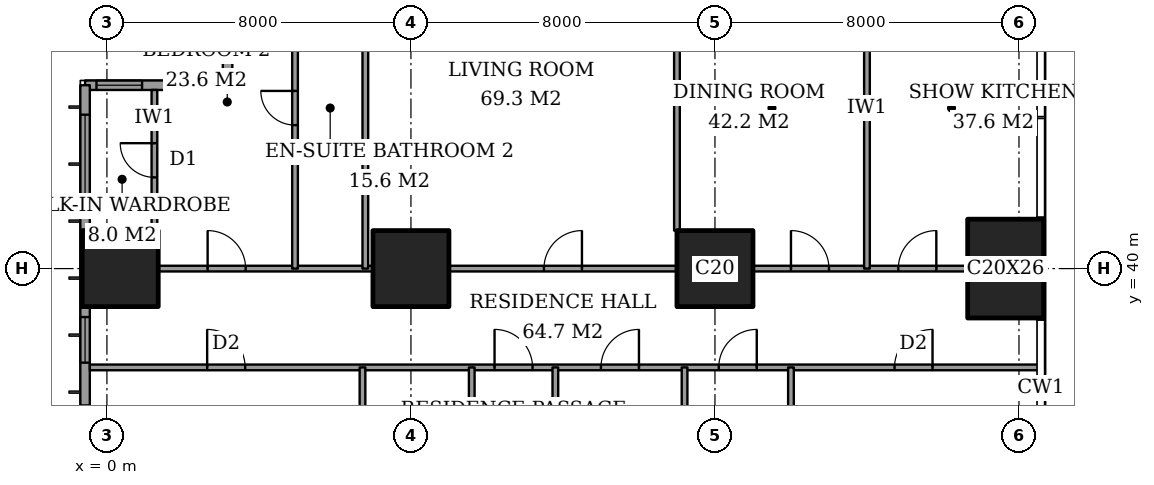
"""IFC4 building model, lengths in metres.
Left out: names, types, materials, properties, quantities, classifications, styles, units other than length and angle.
Written with IfcOpenShell. Run it as: python <this file> out.ifc"""

import sys

from ifc_helpers import new_model, si_unit, direction, frame, frame_2d, origin, origin_2d, place, context, subcontext, project, spatial, rectangle, extrude, element, fill, save


model = new_model("IFC4")
c1 = context("Model", 3, precision=1e-05, world=origin(), true_north=direction((0.0, 1.0)))
c2 = subcontext(c1, "Body", "Model", "MODEL_VIEW")
j1 = project(units=[si_unit("LENGTHUNIT", "METRE"), si_unit("PLANEANGLEUNIT", "RADIAN")], contexts=[c1])
p1 = place(None, origin())
s1 = spatial("IfcSite", under=j1, at=p1, CompositionType="ELEMENT")
p2 = place(p1, origin())
s2 = spatial("IfcBuilding", under=s1, at=p2, CompositionType="ELEMENT")
p3 = place(p2, frame((0.0, 0.0, 76.4)))
s3 = spatial("IfcBuildingStorey", under=s2, at=p3, CompositionType="ELEMENT", Elevation=76.4)
for number, where, z_axis, x_axis in (
    (1, (0.35, 40.0, 0.0), (0.0, 0.0, 1.0), (1.0, 0.0, 0.0)),
    (2, (8.0, 40.0, 0.0), (0.0, 0.0, 1.0), (1.0, 0.0, 0.0)),
    (3, (16.0, 40.0, 0.0), (0.0, 0.0, 1.0), (1.0, 0.0, 0.0)),
):
    element("IfcColumn", number, at=place(p3, frame(where, z_axis=z_axis, x_axis=x_axis)), inside=s3, PredefinedType="COLUMN", context=c2, shape_type="SweptSolid", body=[
        extrude(rectangle(XDim=2.0, YDim=2.0, at=origin_2d()), origin(), (0.0, 0.0, 1.0), 3.6),
    ])
p4 = place(p3, frame((23.65, 40.0, 0.0), z_axis=(0.0, 0.0, 1.0), x_axis=(1.0, 0.0, 0.0)))
e4 = element("IfcColumn", 4, at=p4, inside=s3, PredefinedType="COLUMN", context=c2, shape_type="SweptSolid", body=[
    extrude(rectangle(XDim=2.0, YDim=2.6, at=origin_2d()), origin(), (0.0, 0.0, 1.0), 3.6),
])
p5 = place(p3, frame((3.175, 48.575, 0.0), z_axis=(0.0, 0.0, 1.0), x_axis=(0.0, -1.0, 0.0)))
e5 = element("IfcWall", 5, at=p5, inside=s3, PredefinedType="SOLIDWALL", context=c2, shape_type="SweptSolid", body=[
    extrude(rectangle(XDim=3.75, YDim=0.25, at=frame_2d((1.875, 0.0))), origin(), (0.0, 0.0, 1.0), 3.6),
])
p6 = place(p5, frame((0.738, 0.0, 0.6)))
e6 = element("IfcOpeningElement", 6, at=p6, cuts=e5, PredefinedType="OPENING", context=c2, shape_type="SweptSolid", body=[
    extrude(rectangle(XDim=2.4, YDim=2.0, at=frame_2d((1.2, 1.0))), frame((0.0, 0.135, 0.0), z_axis=(0.0, -1.0, 0.0), x_axis=(1.0, 0.0, 0.0)), (0.0, 0.0, 1.0), 0.27),
])
p7 = place(p3, frame((3.175, 44.825, 0.0), z_axis=(0.0, 0.0, 1.0), x_axis=(-1.0, 0.0, 0.0)))
e7 = element("IfcWall", 7, at=p7, inside=s3, PredefinedType="SOLIDWALL", context=c2, shape_type="SweptSolid", body=[
    extrude(rectangle(XDim=3.75, YDim=0.25, at=frame_2d((1.875, 0.0))), origin(), (0.0, 0.0, 1.0), 3.6),
])
p8 = place(p7, frame((0.363, 0.0, 0.6)))
e8 = element("IfcOpeningElement", 8, at=p8, cuts=e7, PredefinedType="OPENING", context=c2, shape_type="SweptSolid", body=[
    extrude(rectangle(XDim=1.2, YDim=2.0, at=frame_2d((0.6, 1.0))), frame((0.0, 0.135, 0.0), z_axis=(0.0, -1.0, 0.0), x_axis=(1.0, 0.0, 0.0)), (0.0, 0.0, 1.0), 0.27),
])
p9 = place(p7, frame((2.25, 0.0, 0.6)))
e9 = element("IfcOpeningElement", 9, at=p9, cuts=e7, PredefinedType="OPENING", context=c2, shape_type="SweptSolid", body=[
    extrude(rectangle(XDim=1.2, YDim=2.0, at=frame_2d((0.6, 1.0))), frame((0.0, 0.135, 0.0), z_axis=(0.0, -1.0, 0.0), x_axis=(1.0, 0.0, 0.0)), (0.0, 0.0, 1.0), 0.27),
])
p10 = place(p3, frame((-0.575, 44.825, 0.0), z_axis=(0.0, 0.0, 1.0), x_axis=(0.0, -1.0, 0.0)))
e10 = element("IfcWall", 10, at=p10, inside=s3, PredefinedType="SOLIDWALL", context=c2, shape_type="SweptSolid", body=[
    extrude(rectangle(XDim=41.65, YDim=0.25, at=frame_2d((20.825, 0.0))), origin(), (0.0, 0.0, 1.0), 3.6),
])
p11 = place(p10, frame((0.775, 0.0, 0.6)))
e11 = element("IfcOpeningElement", 11, at=p11, cuts=e10, PredefinedType="OPENING", context=c2, shape_type="SweptSolid", body=[
    extrude(rectangle(XDim=2.4, YDim=2.0, at=frame_2d((1.2, 1.0))), frame((0.0, 0.135, 0.0), z_axis=(0.0, -1.0, 0.0), x_axis=(1.0, 0.0, 0.0)), (0.0, 0.0, 1.0), 0.27),
])
p12 = place(p10, frame((6.1, 0.0, 0.6)))
e12 = element("IfcOpeningElement", 12, at=p12, cuts=e10, PredefinedType="OPENING", context=c2, shape_type="SweptSolid", body=[
    extrude(rectangle(XDim=1.2, YDim=2.0, at=frame_2d((0.6, 1.0))), frame((0.0, 0.135, 0.0), z_axis=(0.0, -1.0, 0.0), x_axis=(1.0, 0.0, 0.0)), (0.0, 0.0, 1.0), 0.27),
])
p13 = place(p10, frame((8.425, 0.0, 0.6)))
e13 = element("IfcOpeningElement", 13, at=p13, cuts=e10, PredefinedType="OPENING", context=c2, shape_type="SweptSolid", body=[
    extrude(rectangle(XDim=2.4, YDim=2.0, at=frame_2d((1.2, 1.0))), frame((0.0, 0.135, 0.0), z_axis=(0.0, -1.0, 0.0), x_axis=(1.0, 0.0, 0.0)), (0.0, 0.0, 1.0), 0.27),
])
p14 = place(p10, frame((15.625, 0.0, 0.6)))
e14 = element("IfcOpeningElement", 14, at=p14, cuts=e10, PredefinedType="OPENING", context=c2, shape_type="SweptSolid", body=[
    extrude(rectangle(XDim=2.4, YDim=2.0, at=frame_2d((1.2, 1.0))), frame((0.0, 0.135, 0.0), z_axis=(0.0, -1.0, 0.0), x_axis=(1.0, 0.0, 0.0)), (0.0, 0.0, 1.0), 0.27),
])
p15 = place(p10, frame((23.625, 0.0, 0.6)))
e15 = element("IfcOpeningElement", 15, at=p15, cuts=e10, PredefinedType="OPENING", context=c2, shape_type="SweptSolid", body=[
    extrude(rectangle(XDim=2.4, YDim=2.0, at=frame_2d((1.2, 1.0))), frame((0.0, 0.135, 0.0), z_axis=(0.0, -1.0, 0.0), x_axis=(1.0, 0.0, 0.0)), (0.0, 0.0, 1.0), 0.27),
])
p16 = place(p10, frame((30.625, 0.0, 0.6)))
e16 = element("IfcOpeningElement", 16, at=p16, cuts=e10, PredefinedType="OPENING", context=c2, shape_type="SweptSolid", body=[
    extrude(rectangle(XDim=2.4, YDim=2.0, at=frame_2d((1.2, 1.0))), frame((0.0, 0.135, 0.0), z_axis=(0.0, -1.0, 0.0), x_axis=(1.0, 0.0, 0.0)), (0.0, 0.0, 1.0), 0.27),
])
p17 = place(p10, frame((34.225, 0.0, 0.6)))
e17 = element("IfcOpeningElement", 17, at=p17, cuts=e10, PredefinedType="OPENING", context=c2, shape_type="SweptSolid", body=[
    extrude(rectangle(XDim=1.2, YDim=2.0, at=frame_2d((0.6, 1.0))), frame((0.0, 0.135, 0.0), z_axis=(0.0, -1.0, 0.0), x_axis=(1.0, 0.0, 0.0)), (0.0, 0.0, 1.0), 0.27),
])
p18 = place(p10, frame((38.475, 0.0, 0.6)))
e18 = element("IfcOpeningElement", 18, at=p18, cuts=e10, PredefinedType="OPENING", context=c2, shape_type="SweptSolid", body=[
    extrude(rectangle(XDim=2.4, YDim=2.0, at=frame_2d((1.2, 1.0))), frame((0.0, 0.135, 0.0), z_axis=(0.0, -1.0, 0.0), x_axis=(1.0, 0.0, 0.0)), (0.0, 0.0, 1.0), 0.27),
])
p19 = place(p3, frame((-0.45, 37.4, 0.0), z_axis=(0.0, 0.0, 1.0), x_axis=(1.0, 0.0, 0.0)))
e19 = element("IfcWall", 19, at=p19, inside=s3, PredefinedType="PARTITIONING", context=c2, shape_type="SweptSolid", body=[
    extrude(rectangle(XDim=25.011, YDim=0.15, at=frame_2d((12.505, 0.0))), origin(), (0.0, 0.0, 1.0), 3.35),
])
p20 = place(p19, frame((10.65, 0.0, 0.0)))
e20 = element("IfcOpeningElement", 20, at=p20, cuts=e19, PredefinedType="OPENING", context=c2, shape_type="SweptSolid", body=[
    extrude(rectangle(XDim=1.0, YDim=2.1, at=frame_2d((0.5, 1.05))), frame((0.0, 0.085, 0.0), z_axis=(0.0, -1.0, 0.0), x_axis=(1.0, 0.0, 0.0)), (0.0, 0.0, 1.0), 0.17),
])
p21 = place(p19, frame((3.087, 0.0, 0.0)))
e21 = element("IfcOpeningElement", 21, at=p21, cuts=e19, PredefinedType="OPENING", context=c2, shape_type="SweptSolid", body=[
    extrude(rectangle(XDim=1.0, YDim=2.1, at=frame_2d((0.5, 1.05))), frame((0.0, 0.085, 0.0), z_axis=(0.0, -1.0, 0.0), x_axis=(1.0, 0.0, 0.0)), (0.0, 0.0, 1.0), 0.17),
])
p22 = place(p19, frame((13.45, 0.0, 0.0)))
e22 = element("IfcOpeningElement", 22, at=p22, cuts=e19, PredefinedType="OPENING", context=c2, shape_type="SweptSolid", body=[
    extrude(rectangle(XDim=1.0, YDim=2.1, at=frame_2d((0.5, 1.05))), frame((0.0, 0.085, 0.0), z_axis=(0.0, -1.0, 0.0), x_axis=(1.0, 0.0, 0.0)), (0.0, 0.0, 1.0), 0.17),
])
p23 = place(p19, frame((16.55, 0.0, 0.0)))
e23 = element("IfcOpeningElement", 23, at=p23, cuts=e19, PredefinedType="OPENING", context=c2, shape_type="SweptSolid", body=[
    extrude(rectangle(XDim=1.0, YDim=2.1, at=frame_2d((0.5, 1.05))), frame((0.0, 0.085, 0.0), z_axis=(0.0, -1.0, 0.0), x_axis=(1.0, 0.0, 0.0)), (0.0, 0.0, 1.0), 0.17),
])
p24 = place(p19, frame((21.175, 0.0, 0.0)))
e24 = element("IfcOpeningElement", 24, at=p24, cuts=e19, PredefinedType="OPENING", context=c2, shape_type="SweptSolid", body=[
    extrude(rectangle(XDim=1.0, YDim=2.1, at=frame_2d((0.5, 1.05))), frame((0.0, 0.085, 0.0), z_axis=(0.0, -1.0, 0.0), x_axis=(1.0, 0.0, 0.0)), (0.0, 0.0, 1.0), 0.17),
])
p25 = place(p3, frame((1.35, 40.0, 0.0), z_axis=(0.0, 0.0, 1.0), x_axis=(1.0, 0.0, 0.0)))
e25 = element("IfcWall", 25, at=p25, inside=s3, PredefinedType="PARTITIONING", context=c2, shape_type="SweptSolid", body=[
    extrude(rectangle(XDim=5.65, YDim=0.15, at=frame_2d((2.825, 0.0))), origin(), (0.0, 0.0, 1.0), 3.35),
])
p26 = place(p25, frame((1.3, 0.0, 0.0)))
e26 = element("IfcOpeningElement", 26, at=p26, cuts=e25, PredefinedType="OPENING", context=c2, shape_type="SweptSolid", body=[
    extrude(rectangle(XDim=1.0, YDim=2.1, at=frame_2d((0.5, 1.05))), frame((0.0, 0.085, 0.0), z_axis=(0.0, -1.0, 0.0), x_axis=(1.0, 0.0, 0.0)), (0.0, 0.0, 1.0), 0.17),
])
p27 = place(p3, frame((9.0, 40.0, 0.0), z_axis=(0.0, 0.0, 1.0), x_axis=(1.0, 0.0, 0.0)))
e27 = element("IfcWall", 27, at=p27, inside=s3, PredefinedType="PARTITIONING", context=c2, shape_type="SweptSolid", body=[
    extrude(rectangle(XDim=6.0, YDim=0.15, at=frame_2d((3.0, 0.0))), origin(), (0.0, 0.0, 1.0), 3.35),
])
p28 = place(p27, frame((2.5, 0.0, 0.0)))
e28 = element("IfcOpeningElement", 28, at=p28, cuts=e27, PredefinedType="OPENING", context=c2, shape_type="SweptSolid", body=[
    extrude(rectangle(XDim=1.0, YDim=2.1, at=frame_2d((0.5, 1.05))), frame((0.0, 0.085, 0.0), z_axis=(0.0, -1.0, 0.0), x_axis=(1.0, 0.0, 0.0)), (0.0, 0.0, 1.0), 0.17),
])
p29 = place(p3, frame((17.0, 40.0, 0.0), z_axis=(0.0, 0.0, 1.0), x_axis=(1.0, 0.0, 0.0)))
e29 = element("IfcWall", 29, at=p29, inside=s3, PredefinedType="PARTITIONING", context=c2, shape_type="SweptSolid", body=[
    extrude(rectangle(XDim=5.65, YDim=0.15, at=frame_2d((2.825, 0.0))), origin(), (0.0, 0.0, 1.0), 3.35),
])
p30 = place(p29, frame((1.0, 0.0, 0.0)))
e30 = element("IfcOpeningElement", 30, at=p30, cuts=e29, PredefinedType="OPENING", context=c2, shape_type="SweptSolid", body=[
    extrude(rectangle(XDim=1.0, YDim=2.1, at=frame_2d((0.5, 1.05))), frame((0.0, 0.085, 0.0), z_axis=(0.0, -1.0, 0.0), x_axis=(1.0, 0.0, 0.0)), (0.0, 0.0, 1.0), 0.17),
])
p31 = place(p29, frame((3.825, 0.0, 0.0)))
e31 = element("IfcOpeningElement", 31, at=p31, cuts=e29, PredefinedType="OPENING", context=c2, shape_type="SweptSolid", body=[
    extrude(rectangle(XDim=1.0, YDim=2.1, at=frame_2d((0.5, 1.05))), frame((0.0, 0.085, 0.0), z_axis=(0.0, -1.0, 0.0), x_axis=(1.0, 0.0, 0.0)), (0.0, 0.0, 1.0), 0.17),
])
p32 = place(p3, frame((1.25, 41.0, 0.0), z_axis=(0.0, 0.0, 1.0), x_axis=(0.0, 1.0, 0.0)))
e32 = element("IfcWall", 32, at=p32, inside=s3, PredefinedType="PARTITIONING", context=c2, shape_type="SweptSolid", body=[
    extrude(rectangle(XDim=3.7, YDim=0.15, at=frame_2d((1.85, 0.0))), origin(), (0.0, 0.0, 1.0), 3.35),
])
p33 = place(p32, frame((1.4, 0.0, 0.0)))
e33 = element("IfcOpeningElement", 33, at=p33, cuts=e32, PredefinedType="OPENING", context=c2, shape_type="SweptSolid", body=[
    extrude(rectangle(XDim=0.9, YDim=2.1, at=frame_2d((0.45, 1.05))), frame((0.0, 0.085, 0.0), z_axis=(0.0, -1.0, 0.0), x_axis=(1.0, 0.0, 0.0)), (0.0, 0.0, 1.0), 0.17),
])
p34 = place(p3, frame((4.95, 40.0, 0.0), z_axis=(0.0, 0.0, 1.0), x_axis=(0.0, 1.0, 0.0)))
e34 = element("IfcWall", 34, at=p34, inside=s3, PredefinedType="PARTITIONING", context=c2, shape_type="SweptSolid", body=[
    extrude(rectangle(XDim=8.45, YDim=0.15, at=frame_2d((4.225, 0.0))), origin(), (0.0, 0.0, 1.0), 3.35),
])
p35 = place(p34, frame((3.775, 0.0, 0.0)))
e35 = element("IfcOpeningElement", 35, at=p35, cuts=e34, PredefinedType="OPENING", context=c2, shape_type="SweptSolid", body=[
    extrude(rectangle(XDim=0.9, YDim=2.1, at=frame_2d((0.45, 1.05))), frame((0.0, 0.085, 0.0), z_axis=(0.0, -1.0, 0.0), x_axis=(1.0, 0.0, 0.0)), (0.0, 0.0, 1.0), 0.17),
])
p36 = place(p3, frame((6.725, 33.2, 0.0), z_axis=(0.0, 0.0, 1.0), x_axis=(0.0, 1.0, 0.0)))
e36 = element("IfcWall", 36, at=p36, inside=s3, PredefinedType="PARTITIONING", context=c2, shape_type="SweptSolid", body=[
    extrude(rectangle(XDim=4.2, YDim=0.15, at=frame_2d((2.1, 0.0))), origin(), (0.0, 0.0, 1.0), 3.35),
])
p37 = place(p36, frame((2.1, 0.0, 0.0)))
e37 = element("IfcOpeningElement", 37, at=p37, cuts=e36, PredefinedType="OPENING", context=c2, shape_type="SweptSolid", body=[
    extrude(rectangle(XDim=0.9, YDim=2.1, at=frame_2d((0.45, 1.05))), frame((0.0, 0.085, 0.0), z_axis=(0.0, -1.0, 0.0), x_axis=(1.0, 0.0, 0.0)), (0.0, 0.0, 1.0), 0.17),
])
p38 = place(p3, frame((6.8, 40.0, 0.0), z_axis=(0.0, 0.0, 1.0), x_axis=(0.0, 1.0, 0.0)))
e38 = element("IfcWall", 38, at=p38, inside=s3, PredefinedType="PARTITIONING", context=c2, shape_type="SweptSolid", body=[
    extrude(rectangle(XDim=8.45, YDim=0.15, at=frame_2d((4.225, 0.0))), origin(), (0.0, 0.0, 1.0), 3.35),
])
p39 = place(p3, frame((9.6, 28.0, 0.0), z_axis=(0.0, 0.0, 1.0), x_axis=(0.0, 1.0, 0.0)))
e39 = element("IfcWall", 39, at=p39, inside=s3, PredefinedType="PARTITIONING", context=c2, shape_type="SweptSolid", body=[
    extrude(rectangle(XDim=9.4, YDim=0.15, at=frame_2d((4.7, 0.0))), origin(), (0.0, 0.0, 1.0), 3.35),
])
p40 = place(p39, frame((0.5, 0.0, 0.0)))
e40 = element("IfcOpeningElement", 40, at=p40, cuts=e39, PredefinedType="OPENING", context=c2, shape_type="SweptSolid", body=[
    extrude(rectangle(XDim=1.0, YDim=2.1, at=frame_2d((0.5, 1.05))), frame((0.0, 0.085, 0.0), z_axis=(0.0, -1.0, 0.0), x_axis=(1.0, 0.0, 0.0)), (0.0, 0.0, 1.0), 0.17),
])
p41 = place(p3, frame((11.8, 30.0, 0.0), z_axis=(0.0, 0.0, 1.0), x_axis=(0.0, 1.0, 0.0)))
e41 = element("IfcWall", 41, at=p41, inside=s3, PredefinedType="PARTITIONING", context=c2, shape_type="SweptSolid", body=[
    extrude(rectangle(XDim=7.4, YDim=0.15, at=frame_2d((3.7, 0.0))), origin(), (0.0, 0.0, 1.0), 3.35),
])
p42 = place(p3, frame((15.0, 41.0, 0.0), z_axis=(0.0, 0.0, 1.0), x_axis=(0.0, 1.0, 0.0)))
e42 = element("IfcWall", 42, at=p42, inside=s3, PredefinedType="PARTITIONING", context=c2, shape_type="SweptSolid", body=[
    extrude(rectangle(XDim=5.65, YDim=0.15, at=frame_2d((2.825, 0.0))), origin(), (0.0, 0.0, 1.0), 3.35),
])
p43 = place(p3, frame((15.2, 33.2, 0.0), z_axis=(0.0, 0.0, 1.0), x_axis=(0.0, 1.0, 0.0)))
e43 = element("IfcWall", 43, at=p43, inside=s3, PredefinedType="PARTITIONING", context=c2, shape_type="SweptSolid", body=[
    extrude(rectangle(XDim=4.2, YDim=0.15, at=frame_2d((2.1, 0.0))), origin(), (0.0, 0.0, 1.0), 3.35),
])
p44 = place(p3, frame((18.0, 31.4, 0.0), z_axis=(0.0, 0.0, 1.0), x_axis=(0.0, 1.0, 0.0)))
e44 = element("IfcWall", 44, at=p44, inside=s3, PredefinedType="PARTITIONING", context=c2, shape_type="SweptSolid", body=[
    extrude(rectangle(XDim=6.0, YDim=0.15, at=frame_2d((3.0, 0.0))), origin(), (0.0, 0.0, 1.0), 3.35),
])
p45 = place(p3, frame((20.0, 40.0, 0.0), z_axis=(0.0, 0.0, 1.0), x_axis=(0.0, 1.0, 0.0)))
e45 = element("IfcWall", 45, at=p45, inside=s3, PredefinedType="PARTITIONING", context=c2, shape_type="SweptSolid", body=[
    extrude(rectangle(XDim=8.45, YDim=0.15, at=frame_2d((4.225, 0.0))), origin(), (0.0, 0.0, 1.0), 3.35),
])
p46 = place(p6, origin())
e46 = element("IfcWindow", 46, at=p46, inside=s3, PartitioningType="SINGLE_PANEL", PredefinedType="WINDOW", context=c2, shape_type="SweptSolid", body=[
    extrude(rectangle(XDim=2.4, YDim=2.0, at=frame_2d((1.2, 1.0))), frame((0.0, 0.03, 0.0), z_axis=(0.0, -1.0, 0.0), x_axis=(1.0, 0.0, 0.0)), (0.0, 0.0, 1.0), 0.06),
])
fill(e6, e46)
p47 = place(p8, origin())
e47 = element("IfcWindow", 47, at=p47, inside=s3, PartitioningType="SINGLE_PANEL", PredefinedType="WINDOW", context=c2, shape_type="SweptSolid", body=[
    extrude(rectangle(XDim=1.2, YDim=2.0, at=frame_2d((0.6, 1.0))), frame((0.0, 0.03, 0.0), z_axis=(0.0, -1.0, 0.0), x_axis=(1.0, 0.0, 0.0)), (0.0, 0.0, 1.0), 0.06),
])
fill(e8, e47)
p48 = place(p9, origin())
e48 = element("IfcWindow", 48, at=p48, inside=s3, PartitioningType="SINGLE_PANEL", PredefinedType="WINDOW", context=c2, shape_type="SweptSolid", body=[
    extrude(rectangle(XDim=1.2, YDim=2.0, at=frame_2d((0.6, 1.0))), frame((0.0, 0.03, 0.0), z_axis=(0.0, -1.0, 0.0), x_axis=(1.0, 0.0, 0.0)), (0.0, 0.0, 1.0), 0.06),
])
fill(e9, e48)
p49 = place(p11, origin())
e49 = element("IfcWindow", 49, at=p49, inside=s3, PartitioningType="SINGLE_PANEL", PredefinedType="WINDOW", context=c2, shape_type="SweptSolid", body=[
    extrude(rectangle(XDim=2.4, YDim=2.0, at=frame_2d((1.2, 1.0))), frame((0.0, 0.03, 0.0), z_axis=(0.0, -1.0, 0.0), x_axis=(1.0, 0.0, 0.0)), (0.0, 0.0, 1.0), 0.06),
])
fill(e11, e49)
p50 = place(p12, origin())
e50 = element("IfcWindow", 50, at=p50, inside=s3, PartitioningType="SINGLE_PANEL", PredefinedType="WINDOW", context=c2, shape_type="SweptSolid", body=[
    extrude(rectangle(XDim=1.2, YDim=2.0, at=frame_2d((0.6, 1.0))), frame((0.0, 0.03, 0.0), z_axis=(0.0, -1.0, 0.0), x_axis=(1.0, 0.0, 0.0)), (0.0, 0.0, 1.0), 0.06),
])
fill(e12, e50)
p51 = place(p33, origin())
e51 = element("IfcDoor", 51, at=p51, inside=s3, OperationType="SINGLE_SWING_LEFT", PredefinedType="DOOR", context=c2, shape_type="SweptSolid", body=[
    extrude(rectangle(XDim=0.9, YDim=2.1, at=frame_2d((0.45, 1.05))), frame((0.0, 0.025, 0.0), z_axis=(0.0, -1.0, 0.0), x_axis=(1.0, 0.0, 0.0)), (0.0, 0.0, 1.0), 0.05),
])
fill(e33, e51)
p52 = place(p26, origin())
e52 = element("IfcDoor", 52, at=p52, inside=s3, OperationType="SINGLE_SWING_RIGHT", PredefinedType="DOOR", context=c2, shape_type="SweptSolid", body=[
    extrude(rectangle(XDim=1.0, YDim=2.1, at=frame_2d((0.5, 1.05))), frame((0.0, 0.025, 0.0), z_axis=(0.0, -1.0, 0.0), x_axis=(1.0, 0.0, 0.0)), (0.0, 0.0, 1.0), 0.05),
])
fill(e26, e52)
p53 = place(p35, origin())
e53 = element("IfcDoor", 53, at=p53, inside=s3, OperationType="SINGLE_SWING_LEFT", PredefinedType="DOOR", context=c2, shape_type="SweptSolid", body=[
    extrude(rectangle(XDim=0.9, YDim=2.1, at=frame_2d((0.45, 1.05))), frame((0.0, 0.025, 0.0), z_axis=(0.0, -1.0, 0.0), x_axis=(1.0, 0.0, 0.0)), (0.0, 0.0, 1.0), 0.05),
])
fill(e35, e53)
p54 = place(p28, origin())
e54 = element("IfcDoor", 54, at=p54, inside=s3, OperationType="SINGLE_SWING_LEFT", PredefinedType="DOOR", context=c2, shape_type="SweptSolid", body=[
    extrude(rectangle(XDim=1.0, YDim=2.1, at=frame_2d((0.5, 1.05))), frame((0.0, 0.025, 0.0), z_axis=(0.0, -1.0, 0.0), x_axis=(1.0, 0.0, 0.0)), (0.0, 0.0, 1.0), 0.05),
])
fill(e28, e54)
p55 = place(p30, origin())
e55 = element("IfcDoor", 55, at=p55, inside=s3, OperationType="SINGLE_SWING_RIGHT", PredefinedType="DOOR", context=c2, shape_type="SweptSolid", body=[
    extrude(rectangle(XDim=1.0, YDim=2.1, at=frame_2d((0.5, 1.05))), frame((0.0, 0.025, 0.0), z_axis=(0.0, -1.0, 0.0), x_axis=(1.0, 0.0, 0.0)), (0.0, 0.0, 1.0), 0.05),
])
fill(e30, e55)
p56 = place(p31, origin())
e56 = element("IfcDoor", 56, at=p56, inside=s3, OperationType="SINGLE_SWING_LEFT", PredefinedType="DOOR", context=c2, shape_type="SweptSolid", body=[
    extrude(rectangle(XDim=1.0, YDim=2.1, at=frame_2d((0.5, 1.05))), frame((0.0, 0.025, 0.0), z_axis=(0.0, -1.0, 0.0), x_axis=(1.0, 0.0, 0.0)), (0.0, 0.0, 1.0), 0.05),
])
fill(e31, e56)
p57 = place(p20, origin())
e57 = element("IfcDoor", 57, at=p57, inside=s3, OperationType="SINGLE_SWING_RIGHT", PredefinedType="DOOR", context=c2, shape_type="SweptSolid", body=[
    extrude(rectangle(XDim=1.0, YDim=2.1, at=frame_2d((0.5, 1.05))), frame((0.0, 0.025, 0.0), z_axis=(0.0, -1.0, 0.0), x_axis=(1.0, 0.0, 0.0)), (0.0, 0.0, 1.0), 0.05),
])
fill(e20, e57)
p58 = place(p21, origin())
e58 = element("IfcDoor", 58, at=p58, inside=s3, OperationType="SINGLE_SWING_RIGHT", PredefinedType="DOOR", context=c2, shape_type="SweptSolid", body=[
    extrude(rectangle(XDim=1.0, YDim=2.1, at=frame_2d((0.5, 1.05))), frame((0.0, 0.025, 0.0), z_axis=(0.0, -1.0, 0.0), x_axis=(1.0, 0.0, 0.0)), (0.0, 0.0, 1.0), 0.05),
])
fill(e21, e58)
p59 = place(p22, origin())
e59 = element("IfcDoor", 59, at=p59, inside=s3, OperationType="SINGLE_SWING_LEFT", PredefinedType="DOOR", context=c2, shape_type="SweptSolid", body=[
    extrude(rectangle(XDim=1.0, YDim=2.1, at=frame_2d((0.5, 1.05))), frame((0.0, 0.025, 0.0), z_axis=(0.0, -1.0, 0.0), x_axis=(1.0, 0.0, 0.0)), (0.0, 0.0, 1.0), 0.05),
])
fill(e22, e59)
p60 = place(p23, origin())
e60 = element("IfcDoor", 60, at=p60, inside=s3, OperationType="SINGLE_SWING_LEFT", PredefinedType="DOOR", context=c2, shape_type="SweptSolid", body=[
    extrude(rectangle(XDim=1.0, YDim=2.1, at=frame_2d((0.5, 1.05))), frame((0.0, 0.025, 0.0), z_axis=(0.0, -1.0, 0.0), x_axis=(1.0, 0.0, 0.0)), (0.0, 0.0, 1.0), 0.05),
])
fill(e23, e60)
p61 = place(p24, origin())
e61 = element("IfcDoor", 61, at=p61, inside=s3, OperationType="SINGLE_SWING_LEFT", PredefinedType="DOOR", context=c2, shape_type="SweptSolid", body=[
    extrude(rectangle(XDim=1.0, YDim=2.1, at=frame_2d((0.5, 1.05))), frame((0.0, 0.025, 0.0), z_axis=(0.0, -1.0, 0.0), x_axis=(1.0, 0.0, 0.0)), (0.0, 0.0, 1.0), 0.05),
])
fill(e24, e61)
save(model, sys.argv[1])
